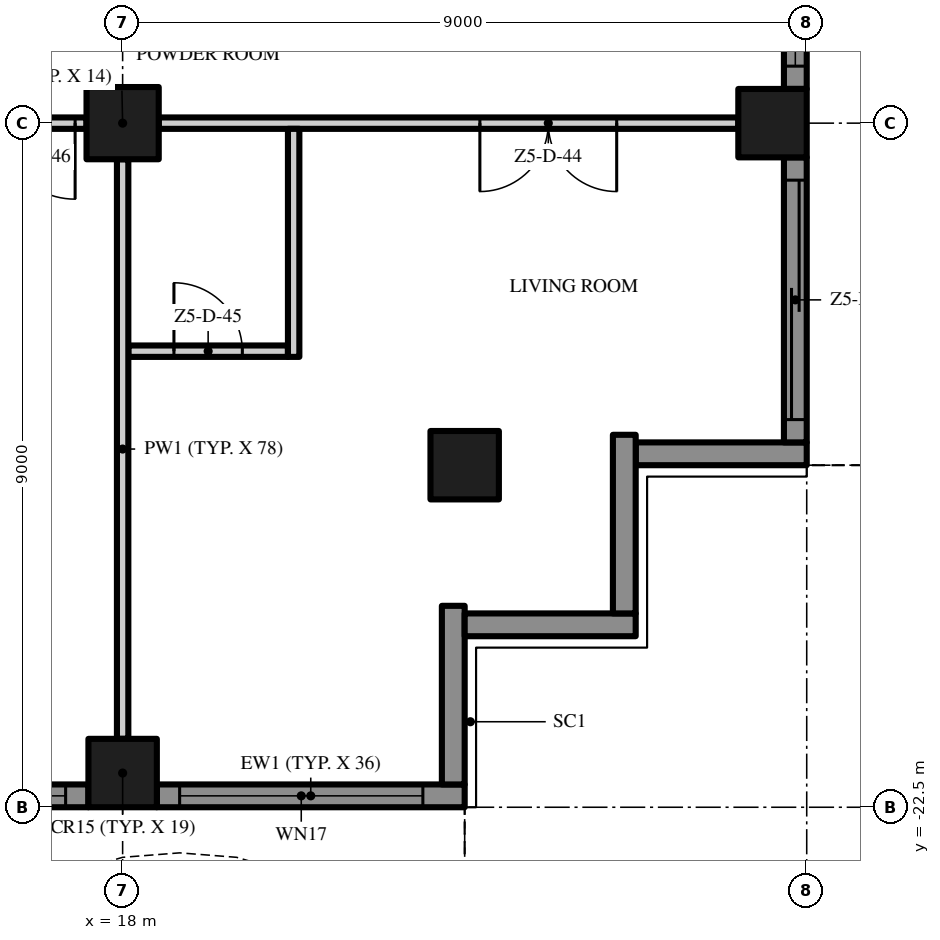
"""IFC4 building model, lengths in metres.
Left out: names, types, materials, properties, quantities, classifications, styles, units other than length and angle.
Written with IfcOpenShell. Run it as: python <this file> out.ifc"""

import sys

from ifc_helpers import new_model, si_unit, direction, frame, frame_2d, origin, origin_2d, place, context, subcontext, project, spatial, polyline, rectangle, outline, extrude, element, fill, save


model = new_model("IFC4")
c1 = context("Model", 3, precision=1e-05, world=origin(), true_north=direction((0.0, 1.0)))
c2 = subcontext(c1, "Body", "Model", "MODEL_VIEW")
j1 = project(units=[si_unit("LENGTHUNIT", "METRE"), si_unit("PLANEANGLEUNIT", "RADIAN")], contexts=[c1])
p1 = place(None, origin())
s1 = spatial("IfcSite", under=j1, at=p1, CompositionType="ELEMENT")
p2 = place(p1, origin())
s2 = spatial("IfcBuilding", under=s1, at=p2, CompositionType="ELEMENT")
p3 = place(p2, frame((0.0, 0.0, 273.0)))
s3 = spatial("IfcBuildingStorey", under=s2, at=p3, CompositionType="ELEMENT", Elevation=273.0)
p4 = place(p3, frame((18.0, -13.5, 0.0), z_axis=(0.0, 0.0, 1.0), x_axis=(1.0, 0.0, 0.0)))
e1 = element("IfcColumn", 1, at=p4, inside=s3, PredefinedType="COLUMN", context=c2, shape_type="SweptSolid", body=[
    extrude(rectangle(XDim=0.95, YDim=0.95, at=origin_2d()), origin(), (0.0, 0.0, 1.0), 3.5),
])
for number, where, z_axis, x_axis in (
    (2, (18.0, -22.05, 0.0), (0.0, 0.0, 1.0), (1.0, 0.0, 0.0)),
    (3, (26.55, -13.5, 0.0), (0.0, 0.0, 1.0), (1.0, 0.0, 0.0)),
    (4, (22.5, -18.0, 0.0), (0.0, 0.0, 1.0), (1.0, 0.0, 0.0)),
):
    element("IfcColumn", number, at=place(p3, frame(where, z_axis=z_axis, x_axis=x_axis)), inside=s3, PredefinedType="COLUMN", context=c2, shape_type="SweptSolid", body=[
        extrude(rectangle(XDim=0.9, YDim=0.9, at=origin_2d()), origin(), (0.0, 0.0, 1.0), 3.5),
    ])
p5 = place(p3, frame((17.55, -22.35, 0.0), z_axis=(0.0, 0.0, 1.0), x_axis=(-1.0, 0.0, 0.0)))
e5 = element("IfcWall", 5, at=p5, inside=s3, PredefinedType="SOLIDWALL", context=c2, shape_type="SweptSolid", body=[
    extrude(rectangle(XDim=8.1, YDim=0.3, at=frame_2d((4.05, 0.0))), origin(), (0.0, 0.0, 1.0), 3.5),
])
p6 = place(p5, frame((4.6, 0.0, 0.0)))
e6 = element("IfcOpeningElement", 6, at=p6, cuts=e5, PredefinedType="OPENING", context=c2, shape_type="SweptSolid", body=[
    extrude(rectangle(XDim=3.2, YDim=2.4, at=frame_2d((1.6, 1.2))), frame((0.0, 0.16, 0.0), z_axis=(0.0, -1.0, 0.0), x_axis=(1.0, 0.0, 0.0)), (0.0, 0.0, 1.0), 0.32),
])
p7 = place(p5, frame((0.3, 0.0, 0.45)))
e7 = element("IfcOpeningElement", 7, at=p7, cuts=e5, PredefinedType="OPENING", context=c2, shape_type="SweptSolid", body=[
    extrude(rectangle(XDim=3.2, YDim=2.65, at=frame_2d((1.6, 1.325))), frame((0.0, 0.16, 0.0), z_axis=(0.0, -1.0, 0.0), x_axis=(1.0, 0.0, 0.0)), (0.0, 0.0, 1.0), 0.32),
])
p8 = place(p3, frame((22.5, -22.35, 0.0), z_axis=(0.0, 0.0, 1.0), x_axis=(-1.0, 0.0, 0.0)))
e8 = element("IfcWall", 8, at=p8, inside=s3, PredefinedType="SOLIDWALL", context=c2, shape_type="SweptSolid", body=[
    extrude(rectangle(XDim=4.05, YDim=0.3, at=frame_2d((2.025, 0.0))), origin(), (0.0, 0.0, 1.0), 3.5),
])
p9 = place(p8, frame((0.55, 0.0, 0.45)))
e9 = element("IfcOpeningElement", 9, at=p9, cuts=e8, PredefinedType="OPENING", context=c2, shape_type="SweptSolid", body=[
    extrude(rectangle(XDim=3.2, YDim=2.65, at=frame_2d((1.6, 1.325))), frame((0.0, 0.16, 0.0), z_axis=(0.0, -1.0, 0.0), x_axis=(1.0, 0.0, 0.0)), (0.0, 0.0, 1.0), 0.32),
])
p10 = place(p3, frame((22.35, -19.85, 0.0), z_axis=(0.0, 0.0, 1.0), x_axis=(0.0, -1.0, 0.0)))
e10 = element("IfcWall", 10, at=p10, inside=s3, PredefinedType="SOLIDWALL", context=c2, shape_type="SweptSolid", body=[
    extrude(rectangle(XDim=2.35, YDim=0.3, at=frame_2d((1.175, 0.0))), origin(), (0.0, 0.0, 1.0), 3.5),
])
p11 = place(p3, frame((24.75, -20.1, 0.0), z_axis=(0.0, 0.0, 1.0), x_axis=(-1.0, 0.0, 0.0)))
e11 = element("IfcWall", 11, at=p11, inside=s3, PredefinedType="SOLIDWALL", context=c2, shape_type="SweptSolid", body=[
    extrude(rectangle(XDim=2.25, YDim=0.3, at=frame_2d((1.125, 0.0))), origin(), (0.0, 0.0, 1.0), 3.5),
])
p12 = place(p3, frame((24.6, -17.6, 0.0), z_axis=(0.0, 0.0, 1.0), x_axis=(0.0, -1.0, 0.0)))
e12 = element("IfcWall", 12, at=p12, inside=s3, PredefinedType="SOLIDWALL", context=c2, shape_type="SweptSolid", body=[
    extrude(rectangle(XDim=2.35, YDim=0.3, at=frame_2d((1.175, 0.0))), origin(), (0.0, 0.0, 1.0), 3.5),
])
p13 = place(p3, frame((27.0, -17.85, 0.0), z_axis=(0.0, 0.0, 1.0), x_axis=(-1.0, 0.0, 0.0)))
e13 = element("IfcWall", 13, at=p13, inside=s3, PredefinedType="SOLIDWALL", context=c2, shape_type="SweptSolid", body=[
    extrude(rectangle(XDim=2.25, YDim=0.3, at=frame_2d((1.125, 0.0))), origin(), (0.0, 0.0, 1.0), 3.5),
])
p14 = place(p3, frame((26.85, -13.95, 0.0), z_axis=(0.0, 0.0, 1.0), x_axis=(0.0, -1.0, 0.0)))
e14 = element("IfcWall", 14, at=p14, inside=s3, PredefinedType="SOLIDWALL", context=c2, shape_type="SweptSolid", body=[
    extrude(rectangle(XDim=3.75, YDim=0.3, at=frame_2d((1.875, 0.0))), origin(), (0.0, 0.0, 1.0), 3.5),
])
p15 = place(p14, frame((0.3, 0.0, 0.0)))
e15 = element("IfcOpeningElement", 15, at=p15, cuts=e14, PredefinedType="OPENING", context=c2, shape_type="SweptSolid", body=[
    extrude(rectangle(XDim=3.15, YDim=2.4, at=frame_2d((1.575, 1.2))), frame((0.0, 0.16, 0.0), z_axis=(0.0, -1.0, 0.0), x_axis=(1.0, 0.0, 0.0)), (0.0, 0.0, 1.0), 0.32),
])
p16 = place(p3, frame((26.85, -4.95, 0.0), z_axis=(0.0, 0.0, 1.0), x_axis=(0.0, -1.0, 0.0)))
e16 = element("IfcWall", 16, at=p16, inside=s3, PredefinedType="SOLIDWALL", context=c2, shape_type="SweptSolid", body=[
    extrude(rectangle(XDim=8.1, YDim=0.3, at=frame_2d((4.05, 0.0))), origin(), (0.0, 0.0, 1.0), 3.5),
])
p17 = place(p16, frame((4.6, 0.0, 0.45)))
e17 = element("IfcOpeningElement", 17, at=p17, cuts=e16, PredefinedType="OPENING", context=c2, shape_type="SweptSolid", body=[
    extrude(rectangle(XDim=3.2, YDim=2.65, at=frame_2d((1.6, 1.325))), frame((0.0, 0.16, 0.0), z_axis=(0.0, -1.0, 0.0), x_axis=(1.0, 0.0, 0.0)), (0.0, 0.0, 1.0), 0.32),
])
p18 = place(p16, frame((0.3, 0.0, 0.45)))
e18 = element("IfcOpeningElement", 18, at=p18, cuts=e16, PredefinedType="OPENING", context=c2, shape_type="SweptSolid", body=[
    extrude(rectangle(XDim=3.2, YDim=2.65, at=frame_2d((1.6, 1.325))), frame((0.0, 0.16, 0.0), z_axis=(0.0, -1.0, 0.0), x_axis=(1.0, 0.0, 0.0)), (0.0, 0.0, 1.0), 0.32),
])
p19 = place(p3, origin())
e19 = element("IfcWall", 19, at=p19, inside=s3, PredefinedType="USERDEFINED", context=c2, shape_type="SweptSolid", body=[
    extrude(outline(polyline([(-22.5, -24.3), (-21.0, -25.005), (-19.5, -25.441), (-18.75, -25.5), (-18.0, -25.441), (-16.5, -25.005), (-15.0, -24.3), (-13.5, -23.595), (-12.0, -23.159), (-11.25, -23.1), (-10.5, -23.159), (-9.0, -23.595), (-7.5, -24.3), (-6.0, -25.005), (-4.5, -25.441), (-3.75, -25.5), (-3.0, -25.441), (-1.5, -25.005), (0.0, -24.3), (1.5, -23.595), (3.0, -23.159), (3.75, -23.1), (4.5, -23.159), (6.0, -23.595), (7.5, -24.3), (9.0, -25.005), (10.5, -25.441), (11.25, -25.5), (12.0, -25.441), (13.5, -25.005), (15.0, -24.3), (16.5, -23.595), (18.0, -23.159), (18.75, -23.1), (19.5, -23.159), (21.0, -23.595), (22.5, -24.3), (22.606, -24.074), (21.089, -23.36), (19.545, -22.911), (18.75, -22.849), (17.955, -22.911), (16.411, -23.36), (14.894, -24.074), (13.411, -24.771), (11.955, -25.194), (11.25, -25.249), (10.545, -25.194), (9.089, -24.771), (7.606, -24.074), (6.089, -23.36), (4.545, -22.911), (3.75, -22.849), (2.955, -22.911), (1.411, -23.36), (-0.106, -24.074), (-1.589, -24.771), (-3.045, -25.194), (-3.75, -25.249), (-4.455, -25.194), (-5.911, -24.771), (-7.394, -24.074), (-8.911, -23.36), (-10.455, -22.911), (-11.25, -22.849), (-12.045, -22.911), (-13.589, -23.36), (-15.106, -24.074), (-16.589, -24.771), (-18.045, -25.194), (-18.75, -25.249), (-19.455, -25.194), (-20.911, -24.771), (-22.394, -24.074), (-22.5, -24.3)])), origin(), (0.0, 0.0, 1.0), 0.9),
])
p20 = place(p3, origin())
e20 = element("IfcWall", 20, at=p20, inside=s3, PredefinedType="USERDEFINED", context=c2, shape_type="SweptSolid", body=[
    extrude(outline(polyline([(28.8, -18.0), (29.505, -16.5), (29.941, -15.0), (30.0, -14.25), (29.941, -13.5), (29.505, -12.0), (28.8, -10.5), (28.095, -9.0), (27.659, -7.5), (27.6, -6.75), (27.659, -6.0), (28.095, -4.5), (28.8, -3.0), (29.505, -1.5), (29.941, 0.0), (30.0, 0.75), (29.941, 1.5), (29.505, 3.0), (28.8, 4.5), (28.095, 6.0), (27.659, 7.5), (27.6, 8.25), (27.659, 9.0), (28.095, 10.5), (28.8, 12.0), (29.505, 13.5), (29.941, 15.0), (30.0, 15.75), (29.941, 16.5), (29.505, 18.0), (29.265, 17.93), (29.694, 16.455), (29.749, 15.75), (29.694, 15.045), (29.271, 13.589), (28.574, 12.106), (27.86, 10.589), (27.411, 9.045), (27.349, 8.25), (27.411, 7.455), (27.86, 5.911), (28.574, 4.394), (29.271, 2.911), (29.694, 1.455), (29.749, 0.75), (29.694, 0.045), (29.271, -1.411), (28.574, -2.894), (27.86, -4.411), (27.411, -5.955), (27.349, -6.75), (27.411, -7.545), (27.86, -9.089), (28.574, -10.606), (29.271, -12.089), (29.694, -13.545), (29.749, -14.25), (29.694, -14.955), (29.271, -16.411), (28.574, -17.894), (28.8, -18.0)])), origin(), (0.0, 0.0, 1.0), 0.9),
])
p21 = place(p3, frame((18.075, -16.5, 0.0), z_axis=(0.0, 0.0, 1.0), x_axis=(1.0, 0.0, 0.0)))
e21 = element("IfcWall", 21, at=p21, inside=s3, PredefinedType="PARTITIONING", context=c2, shape_type="SweptSolid", body=[
    extrude(rectangle(XDim=2.1, YDim=0.15, at=frame_2d((1.05, 0.0))), origin(), (0.0, 0.0, 1.0), 3.5),
])
p22 = place(p21, frame((0.6, 0.0, 0.0)))
e22 = element("IfcOpeningElement", 22, at=p22, cuts=e21, PredefinedType="OPENING", context=c2, shape_type="SweptSolid", body=[
    extrude(rectangle(XDim=0.9, YDim=2.1, at=frame_2d((0.45, 1.05))), frame((0.0, 0.085, 0.0), z_axis=(0.0, -1.0, 0.0), x_axis=(1.0, 0.0, 0.0)), (0.0, 0.0, 1.0), 0.17),
])
p23 = place(p3, frame((17.525, -13.5, 0.0), z_axis=(0.0, 0.0, 1.0), x_axis=(-1.0, 0.0, 0.0)))
e23 = element("IfcWall", 23, at=p23, inside=s3, PredefinedType="PARTITIONING", context=c2, shape_type="SweptSolid", body=[
    extrude(rectangle(XDim=8.05, YDim=0.15, at=frame_2d((4.025, 0.0))), origin(), (0.0, 0.0, 1.0), 3.5),
])
p24 = place(p23, frame((0.15, 0.0, 0.0)))
e24 = element("IfcOpeningElement", 24, at=p24, cuts=e23, PredefinedType="OPENING", context=c2, shape_type="SweptSolid", body=[
    extrude(rectangle(XDim=1.0, YDim=2.4, at=frame_2d((0.5, 1.2))), frame((0.0, 0.085, 0.0), z_axis=(0.0, -1.0, 0.0), x_axis=(1.0, 0.0, 0.0)), (0.0, 0.0, 1.0), 0.17),
])
p25 = place(p23, frame((6.9, 0.0, 0.0)))
e25 = element("IfcOpeningElement", 25, at=p25, cuts=e23, PredefinedType="OPENING", context=c2, shape_type="SweptSolid", body=[
    extrude(rectangle(XDim=1.0, YDim=2.4, at=frame_2d((0.5, 1.2))), frame((0.0, 0.085, 0.0), z_axis=(0.0, -1.0, 0.0), x_axis=(1.0, 0.0, 0.0)), (0.0, 0.0, 1.0), 0.17),
])
p26 = place(p3, frame((26.1, -13.5, 0.0), z_axis=(0.0, 0.0, 1.0), x_axis=(-1.0, 0.0, 0.0)))
e26 = element("IfcWall", 26, at=p26, inside=s3, PredefinedType="PARTITIONING", context=c2, shape_type="SweptSolid", body=[
    extrude(rectangle(XDim=7.625, YDim=0.15, at=frame_2d((3.812, 0.0))), origin(), (0.0, 0.0, 1.0), 3.5),
])
p27 = place(p26, frame((1.6, 0.0, 0.0)))
e27 = element("IfcOpeningElement", 27, at=p27, cuts=e26, PredefinedType="OPENING", context=c2, shape_type="SweptSolid", body=[
    extrude(rectangle(XDim=1.8, YDim=2.4, at=frame_2d((0.9, 1.2))), frame((0.0, 0.085, 0.0), z_axis=(0.0, -1.0, 0.0), x_axis=(1.0, 0.0, 0.0)), (0.0, 0.0, 1.0), 0.17),
])
p28 = place(p3, frame((18.0, -21.6, 0.0), z_axis=(0.0, 0.0, 1.0), x_axis=(0.0, 1.0, 0.0)))
e28 = element("IfcWall", 28, at=p28, inside=s3, PredefinedType="PARTITIONING", context=c2, shape_type="SweptSolid", body=[
    extrude(rectangle(XDim=7.625, YDim=0.15, at=frame_2d((3.812, 0.0))), origin(), (0.0, 0.0, 1.0), 3.5),
])
p29 = place(p3, frame((20.25, -16.575, 0.0), z_axis=(0.0, 0.0, 1.0), x_axis=(0.0, 1.0, 0.0)))
e29 = element("IfcWall", 29, at=p29, inside=s3, PredefinedType="PARTITIONING", context=c2, shape_type="SweptSolid", body=[
    extrude(rectangle(XDim=3.0, YDim=0.15, at=frame_2d((1.5, 0.0))), origin(), (0.0, 0.0, 1.0), 3.5),
])
p30 = place(p7, origin())
e30 = element("IfcWindow", 30, at=p30, inside=s3, PartitioningType="SINGLE_PANEL", PredefinedType="WINDOW", context=c2, shape_type="SweptSolid", body=[
    extrude(rectangle(XDim=3.2, YDim=2.65, at=frame_2d((1.6, 1.325))), frame((0.0, 0.03, 0.0), z_axis=(0.0, -1.0, 0.0), x_axis=(1.0, 0.0, 0.0)), (0.0, 0.0, 1.0), 0.06),
])
fill(e7, e30)
p31 = place(p9, origin())
e31 = element("IfcWindow", 31, at=p31, inside=s3, PartitioningType="SINGLE_PANEL", PredefinedType="WINDOW", context=c2, shape_type="SweptSolid", body=[
    extrude(rectangle(XDim=3.2, YDim=2.65, at=frame_2d((1.6, 1.325))), frame((0.0, 0.03, 0.0), z_axis=(0.0, -1.0, 0.0), x_axis=(1.0, 0.0, 0.0)), (0.0, 0.0, 1.0), 0.06),
])
fill(e9, e31)
p32 = place(p15, origin())
e32 = element("IfcDoor", 32, at=p32, inside=s3, OperationType="SINGLE_SWING_LEFT", PredefinedType="DOOR", context=c2, shape_type="SweptSolid", body=[
    extrude(rectangle(XDim=3.15, YDim=2.4, at=frame_2d((1.575, 1.2))), frame((0.0, 0.025, 0.0), z_axis=(0.0, -1.0, 0.0), x_axis=(1.0, 0.0, 0.0)), (0.0, 0.0, 1.0), 0.05),
])
fill(e15, e32)
p33 = place(p17, origin())
e33 = element("IfcWindow", 33, at=p33, inside=s3, PartitioningType="SINGLE_PANEL", PredefinedType="WINDOW", context=c2, shape_type="SweptSolid", body=[
    extrude(rectangle(XDim=3.2, YDim=2.65, at=frame_2d((1.6, 1.325))), frame((0.0, 0.03, 0.0), z_axis=(0.0, -1.0, 0.0), x_axis=(1.0, 0.0, 0.0)), (0.0, 0.0, 1.0), 0.06),
])
fill(e17, e33)
p34 = place(p27, origin())
e34 = element("IfcDoor", 34, at=p34, inside=s3, OperationType="DOUBLE_DOOR_SINGLE_SWING", PredefinedType="DOOR", context=c2, shape_type="SweptSolid", body=[
    extrude(rectangle(XDim=1.8, YDim=2.4, at=frame_2d((0.9, 1.2))), frame((0.0, 0.025, 0.0), z_axis=(0.0, -1.0, 0.0), x_axis=(1.0, 0.0, 0.0)), (0.0, 0.0, 1.0), 0.05),
])
fill(e27, e34)
p35 = place(p22, origin())
e35 = element("IfcDoor", 35, at=p35, inside=s3, OperationType="SINGLE_SWING_LEFT", PredefinedType="DOOR", context=c2, shape_type="SweptSolid", body=[
    extrude(rectangle(XDim=0.9, YDim=2.1, at=frame_2d((0.45, 1.05))), frame((0.0, 0.025, 0.0), z_axis=(0.0, -1.0, 0.0), x_axis=(1.0, 0.0, 0.0)), (0.0, 0.0, 1.0), 0.05),
])
fill(e22, e35)
p36 = place(p24, origin())
e36 = element("IfcDoor", 36, at=p36, inside=s3, OperationType="SINGLE_SWING_LEFT", PredefinedType="DOOR", context=c2, shape_type="SweptSolid", body=[
    extrude(rectangle(XDim=1.0, YDim=2.4, at=frame_2d((0.5, 1.2))), frame((0.0, 0.025, 0.0), z_axis=(0.0, -1.0, 0.0), x_axis=(1.0, 0.0, 0.0)), (0.0, 0.0, 1.0), 0.05),
])
fill(e24, e36)
save(model, sys.argv[1])
